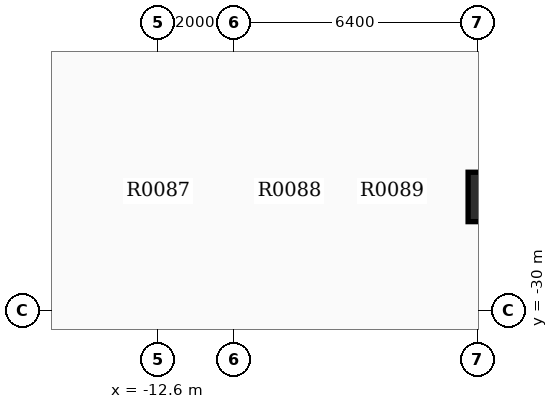
"""IFC4 building model, lengths in metres.
Left out: names, types, materials, properties, quantities, classifications, styles, units other than length and angle.
Written with IfcOpenShell. Run it as: python <this file> out.ifc"""

import sys

from ifc_helpers import new_model, si_unit, direction, frame, origin, origin_2d, place, context, subcontext, project, spatial, rectangle, extrude, element, save


model = new_model("IFC4")
c1 = context("Model", 3, precision=1e-05, world=origin(), true_north=direction((0.0, 1.0)))
c2 = subcontext(c1, "Body", "Model", "MODEL_VIEW")
j1 = project(units=[si_unit("LENGTHUNIT", "METRE"), si_unit("PLANEANGLEUNIT", "RADIAN")], contexts=[c1])
p1 = place(None, origin())
s1 = spatial("IfcSite", under=j1, at=p1, CompositionType="ELEMENT")
p2 = place(p1, origin())
s2 = spatial("IfcBuilding", under=s1, at=p2, CompositionType="ELEMENT")
p3 = place(p2, frame((0.0, 0.0, -5.2)))
s3 = spatial("IfcBuildingStorey", under=s2, at=p3, CompositionType="ELEMENT", Elevation=-5.2)
p4 = place(p3, frame((-3.8, -27.0, 0.0), z_axis=(0.0, 0.0, 1.0), x_axis=(1.0, 0.0, 0.0)))
e1 = element("IfcColumn", 1, at=p4, inside=s3, PredefinedType="COLUMN", context=c2, shape_type="SweptSolid", body=[
    extrude(rectangle(XDim=1.3, YDim=1.3, at=origin_2d()), origin(), (0.0, 0.0, 1.0), 5.2),
])
save(model, sys.argv[1])
